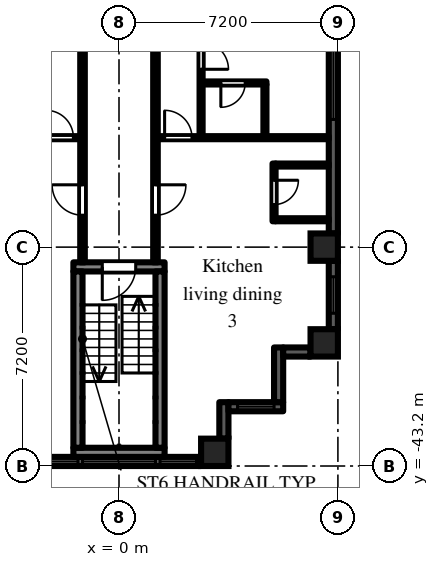
"""IFC4 building model, lengths in metres.
Left out: names, types, materials, properties, quantities, classifications, styles, units other than length and angle.
Written with IfcOpenShell. Run it as: python <this file> out.ifc"""

import sys

from ifc_helpers import new_model, si_unit, direction, frame, frame_2d, origin, origin_2d, place, context, subcontext, project, spatial, rectangle, extrude, element, fill, save


model = new_model("IFC4")
c1 = context("Model", 3, precision=1e-05, world=origin(), true_north=direction((0.0, 1.0)))
c2 = subcontext(c1, "Body", "Model", "MODEL_VIEW")
j1 = project(units=[si_unit("LENGTHUNIT", "METRE"), si_unit("PLANEANGLEUNIT", "RADIAN")], contexts=[c1])
p1 = place(None, origin())
s1 = spatial("IfcSite", under=j1, at=p1, CompositionType="ELEMENT")
p2 = place(p1, origin())
s2 = spatial("IfcBuilding", under=s1, at=p2, CompositionType="ELEMENT")
p3 = place(p2, frame((0.0, 0.0, 20.7)))
s3 = spatial("IfcBuildingStorey", under=s2, at=p3, CompositionType="ELEMENT", Elevation=20.7)
for number, where, z_axis, x_axis in (
    (1, (3.15, -42.75, 0.0), (0.0, 0.0, 1.0), (1.0, 0.0, 0.0)),
    (2, (6.75, -39.15, 0.0), (0.0, 0.0, 1.0), (1.0, 0.0, 0.0)),
    (3, (6.75, -36.0, 0.0), (0.0, 0.0, 1.0), (1.0, 0.0, 0.0)),
):
    element("IfcColumn", number, at=place(p3, frame(where, z_axis=z_axis, x_axis=x_axis)), inside=s3, PredefinedType="COLUMN", context=c2, shape_type="SweptSolid", body=[
        extrude(rectangle(XDim=0.9, YDim=0.9, at=origin_2d()), origin(), (0.0, 0.0, 1.0), 3.0),
    ])
p4 = place(p3, frame((-2.7, -43.05, 0.0), z_axis=(0.0, 0.0, 1.0), x_axis=(1.0, 0.0, 0.0)))
e4 = element("IfcWall", 4, at=p4, inside=s3, PredefinedType="SOLIDWALL", context=c2, shape_type="SweptSolid", body=[
    extrude(rectangle(XDim=5.4, YDim=0.3, at=frame_2d((2.7, 0.0))), origin(), (0.0, 0.0, 1.0), 2.1),
])
p5 = place(p4, frame((1.5, 0.0, 0.2)))
e5 = element("IfcOpeningElement", 5, at=p5, cuts=e4, PredefinedType="OPENING", context=c2, shape_type="SweptSolid", body=[
    extrude(rectangle(XDim=2.4, YDim=1.85, at=frame_2d((1.2, 0.925))), frame((0.0, 0.16, 0.0), z_axis=(0.0, -1.0, 0.0), x_axis=(1.0, 0.0, 0.0)), (0.0, 0.0, 1.0), 0.32),
])
p6 = place(p4, frame((0.15, 0.0, 0.2)))
e6 = element("IfcOpeningElement", 6, at=p6, cuts=e4, PredefinedType="OPENING", context=c2, shape_type="SweptSolid", body=[
    extrude(rectangle(XDim=1.2, YDim=1.85, at=frame_2d((0.6, 0.925))), frame((0.0, 0.16, 0.0), z_axis=(0.0, -1.0, 0.0), x_axis=(1.0, 0.0, 0.0)), (0.0, 0.0, 1.0), 0.32),
])
p7 = place(p4, frame((4.05, 0.0, 0.2)))
e7 = element("IfcOpeningElement", 7, at=p7, cuts=e4, PredefinedType="OPENING", context=c2, shape_type="SweptSolid", body=[
    extrude(rectangle(XDim=1.2, YDim=1.85, at=frame_2d((0.6, 0.925))), frame((0.0, 0.16, 0.0), z_axis=(0.0, -1.0, 0.0), x_axis=(1.0, 0.0, 0.0)), (0.0, 0.0, 1.0), 0.32),
])
p8 = place(p3, frame((3.45, -42.3, 0.0), z_axis=(0.0, 0.0, 1.0), x_axis=(0.0, 1.0, 0.0)))
e8 = element("IfcWall", 8, at=p8, inside=s3, PredefinedType="SOLIDWALL", context=c2, shape_type="SweptSolid", body=[
    extrude(rectangle(XDim=1.2, YDim=0.3, at=frame_2d((0.6, 0.0))), origin(), (0.0, 0.0, 1.0), 2.575),
])
p9 = place(p3, frame((3.6, -41.25, 0.0), z_axis=(0.0, 0.0, 1.0), x_axis=(1.0, 0.0, 0.0)))
e9 = element("IfcWall", 9, at=p9, inside=s3, PredefinedType="SOLIDWALL", context=c2, shape_type="SweptSolid", body=[
    extrude(rectangle(XDim=1.8, YDim=0.3, at=frame_2d((0.9, 0.0))), origin(), (0.0, 0.0, 1.0), 2.575),
])
p10 = place(p9, frame((0.3, 0.0, 0.2)))
e10 = element("IfcOpeningElement", 10, at=p10, cuts=e9, PredefinedType="OPENING", context=c2, shape_type="SweptSolid", body=[
    extrude(rectangle(XDim=1.2, YDim=1.85, at=frame_2d((0.6, 0.925))), frame((0.0, 0.16, 0.0), z_axis=(0.0, -1.0, 0.0), x_axis=(1.0, 0.0, 0.0)), (0.0, 0.0, 1.0), 0.32),
])
p11 = place(p3, frame((5.25, -41.1, 0.0), z_axis=(0.0, 0.0, 1.0), x_axis=(0.0, 1.0, 0.0)))
e11 = element("IfcWall", 11, at=p11, inside=s3, PredefinedType="SOLIDWALL", context=c2, shape_type="SweptSolid", body=[
    extrude(rectangle(XDim=1.8, YDim=0.3, at=frame_2d((0.9, 0.0))), origin(), (0.0, 0.0, 1.0), 2.575),
])
p12 = place(p3, frame((5.4, -39.45, 0.0), z_axis=(0.0, 0.0, 1.0), x_axis=(1.0, 0.0, 0.0)))
e12 = element("IfcWall", 12, at=p12, inside=s3, PredefinedType="SOLIDWALL", context=c2, shape_type="SweptSolid", body=[
    extrude(rectangle(XDim=0.9, YDim=0.3, at=frame_2d((0.45, 0.0))), origin(), (0.0, 0.0, 1.0), 2.575),
])
p13 = place(p3, frame((7.05, -38.7, 0.0), z_axis=(0.0, 0.0, 1.0), x_axis=(0.0, 1.0, 0.0)))
e13 = element("IfcWall", 13, at=p13, inside=s3, PredefinedType="SOLIDWALL", context=c2, shape_type="SweptSolid", body=[
    extrude(rectangle(XDim=2.25, YDim=0.3, at=frame_2d((1.125, 0.0))), origin(), (0.0, 0.0, 1.0), 2.1),
])
p14 = place(p13, frame((0.525, 0.0, 0.2)))
e14 = element("IfcOpeningElement", 14, at=p14, cuts=e13, PredefinedType="OPENING", context=c2, shape_type="SweptSolid", body=[
    extrude(rectangle(XDim=1.2, YDim=1.85, at=frame_2d((0.6, 0.925))), frame((0.0, 0.16, 0.0), z_axis=(0.0, -1.0, 0.0), x_axis=(1.0, 0.0, 0.0)), (0.0, 0.0, 1.0), 0.32),
])
p15 = place(p3, frame((7.05, -35.55, 0.0), z_axis=(0.0, 0.0, 1.0), x_axis=(0.0, 1.0, 0.0)))
e15 = element("IfcWall", 15, at=p15, inside=s3, PredefinedType="SOLIDWALL", context=c2, shape_type="SweptSolid", body=[
    extrude(rectangle(XDim=6.3, YDim=0.3, at=frame_2d((3.15, 0.0))), origin(), (0.0, 0.0, 1.0), 2.1),
])
p16 = place(p15, frame((3.75, 0.0, 0.2)))
e16 = element("IfcOpeningElement", 16, at=p16, cuts=e15, PredefinedType="OPENING", context=c2, shape_type="SweptSolid", body=[
    extrude(rectangle(XDim=2.4, YDim=1.85, at=frame_2d((1.2, 0.925))), frame((0.0, 0.16, 0.0), z_axis=(0.0, -1.0, 0.0), x_axis=(1.0, 0.0, 0.0)), (0.0, 0.0, 1.0), 0.32),
])
p17 = place(p3, frame((-1.5, -36.65, 0.0), z_axis=(0.0, 0.0, 1.0), x_axis=(1.0, 0.0, 0.0)))
e17 = element("IfcWall", 17, at=p17, inside=s3, PredefinedType="SHEAR", context=c2, shape_type="SweptSolid", body=[
    extrude(rectangle(XDim=3.0, YDim=0.3, at=frame_2d((1.5, 0.0))), origin(), (0.0, 0.0, 1.0), 2.575),
])
p18 = place(p17, frame((0.95, 0.0, 0.0)))
e18 = element("IfcOpeningElement", 18, at=p18, cuts=e17, PredefinedType="OPENING", context=c2, shape_type="SweptSolid", body=[
    extrude(rectangle(XDim=1.1, YDim=2.1, at=frame_2d((0.55, 1.05))), frame((0.0, 0.16, 0.0), z_axis=(0.0, -1.0, 0.0), x_axis=(1.0, 0.0, 0.0)), (0.0, 0.0, 1.0), 0.32),
])
p19 = place(p3, frame((-1.5, -42.75, 0.0), z_axis=(0.0, 0.0, 1.0), x_axis=(1.0, 0.0, 0.0)))
e19 = element("IfcWall", 19, at=p19, inside=s3, PredefinedType="SHEAR", context=c2, shape_type="SweptSolid", body=[
    extrude(rectangle(XDim=3.0, YDim=0.3, at=frame_2d((1.5, 0.0))), origin(), (0.0, 0.0, 1.0), 2.575),
])
for number, where, z_axis, x_axis in (
    (20, (-1.35, -36.8, 0.0), (0.0, 0.0, 1.0), (0.0, -1.0, 0.0)),
    (21, (1.35, -36.8, 0.0), (0.0, 0.0, 1.0), (0.0, -1.0, 0.0)),
):
    element("IfcWall", number, at=place(p3, frame(where, z_axis=z_axis, x_axis=x_axis)), inside=s3, PredefinedType="SHEAR", context=c2, shape_type="SweptSolid", body=[
        extrude(rectangle(XDim=5.8, YDim=0.3, at=frame_2d((2.9, 0.0))), origin(), (0.0, 0.0, 1.0), 2.575),
    ])
p20 = place(p3, frame((-6.9, -32.4, 0.0), z_axis=(0.0, 0.0, 1.0), x_axis=(1.0, 0.0, 0.0)))
e22 = element("IfcWall", 22, at=p20, inside=s3, PredefinedType="PARTITIONING", context=c2, shape_type="SweptSolid", body=[
    extrude(rectangle(XDim=5.625, YDim=0.1, at=frame_2d((2.812, 0.0))), origin(), (0.0, 0.0, 1.0), 2.575),
])
p21 = place(p20, frame((4.5, 0.0, 0.0)))
e23 = element("IfcOpeningElement", 23, at=p21, cuts=e22, PredefinedType="OPENING", context=c2, shape_type="SweptSolid", body=[
    extrude(rectangle(XDim=0.9, YDim=2.1, at=frame_2d((0.45, 1.05))), frame((0.0, 0.06, 0.0), z_axis=(0.0, -1.0, 0.0), x_axis=(1.0, 0.0, 0.0)), (0.0, 0.0, 1.0), 0.12),
])
p22 = place(p3, frame((-1.2, -36.5, 0.0), z_axis=(0.0, 0.0, 1.0), x_axis=(0.0, 1.0, 0.0)))
e24 = element("IfcWall", 24, at=p22, inside=s3, PredefinedType="PARTITIONING", context=c2, shape_type="SweptSolid", body=[
    extrude(rectangle(XDim=35.225, YDim=0.15, at=frame_2d((17.613, 0.0))), origin(), (0.0, 0.0, 1.0), 2.575),
])
p23 = place(p22, frame((30.35, 0.0, 0.0)))
e25 = element("IfcOpeningElement", 25, at=p23, cuts=e24, PredefinedType="OPENING", context=c2, shape_type="SweptSolid", body=[
    extrude(rectangle(XDim=0.9, YDim=2.1, at=frame_2d((0.45, 1.05))), frame((0.0, 0.085, 0.0), z_axis=(0.0, -1.0, 0.0), x_axis=(1.0, 0.0, 0.0)), (0.0, 0.0, 1.0), 0.17),
])
p24 = place(p22, frame((23.05, 0.0, 0.0)))
e26 = element("IfcOpeningElement", 26, at=p24, cuts=e24, PredefinedType="OPENING", context=c2, shape_type="SweptSolid", body=[
    extrude(rectangle(XDim=0.9, YDim=2.1, at=frame_2d((0.45, 1.05))), frame((0.0, 0.085, 0.0), z_axis=(0.0, -1.0, 0.0), x_axis=(1.0, 0.0, 0.0)), (0.0, 0.0, 1.0), 0.17),
])
p25 = place(p22, frame((26.65, 0.0, 0.0)))
e27 = element("IfcOpeningElement", 27, at=p25, cuts=e24, PredefinedType="OPENING", context=c2, shape_type="SweptSolid", body=[
    extrude(rectangle(XDim=0.9, YDim=2.1, at=frame_2d((0.45, 1.05))), frame((0.0, 0.085, 0.0), z_axis=(0.0, -1.0, 0.0), x_axis=(1.0, 0.0, 0.0)), (0.0, 0.0, 1.0), 0.17),
])
p26 = place(p22, frame((19.85, 0.0, 0.0)))
e28 = element("IfcOpeningElement", 28, at=p26, cuts=e24, PredefinedType="OPENING", context=c2, shape_type="SweptSolid", body=[
    extrude(rectangle(XDim=0.9, YDim=2.1, at=frame_2d((0.45, 1.05))), frame((0.0, 0.085, 0.0), z_axis=(0.0, -1.0, 0.0), x_axis=(1.0, 0.0, 0.0)), (0.0, 0.0, 1.0), 0.17),
])
p27 = place(p22, frame((1.55, 0.0, 0.0)))
e29 = element("IfcOpeningElement", 29, at=p27, cuts=e24, PredefinedType="OPENING", context=c2, shape_type="SweptSolid", body=[
    extrude(rectangle(XDim=1.0, YDim=2.1, at=frame_2d((0.5, 1.05))), frame((0.0, 0.085, 0.0), z_axis=(0.0, -1.0, 0.0), x_axis=(1.0, 0.0, 0.0)), (0.0, 0.0, 1.0), 0.17),
])
p28 = place(p3, frame((1.2, -36.5, 0.0), z_axis=(0.0, 0.0, 1.0), x_axis=(0.0, 1.0, 0.0)))
e30 = element("IfcWall", 30, at=p28, inside=s3, PredefinedType="PARTITIONING", context=c2, shape_type="SweptSolid", body=[
    extrude(rectangle(XDim=35.375, YDim=0.15, at=frame_2d((17.688, 0.0))), origin(), (0.0, 0.0, 1.0), 2.575),
])
p29 = place(p28, frame((31.85, 0.0, 0.0)))
e31 = element("IfcOpeningElement", 31, at=p29, cuts=e30, PredefinedType="OPENING", context=c2, shape_type="SweptSolid", body=[
    extrude(rectangle(XDim=0.9, YDim=2.1, at=frame_2d((0.45, 1.05))), frame((0.0, 0.085, 0.0), z_axis=(0.0, -1.0, 0.0), x_axis=(1.0, 0.0, 0.0)), (0.0, 0.0, 1.0), 0.17),
])
p30 = place(p28, frame((23.45, 0.0, 0.0)))
e32 = element("IfcOpeningElement", 32, at=p30, cuts=e30, PredefinedType="OPENING", context=c2, shape_type="SweptSolid", body=[
    extrude(rectangle(XDim=0.9, YDim=2.1, at=frame_2d((0.45, 1.05))), frame((0.0, 0.085, 0.0), z_axis=(0.0, -1.0, 0.0), x_axis=(1.0, 0.0, 0.0)), (0.0, 0.0, 1.0), 0.17),
])
p31 = place(p28, frame((1.55, 0.0, 0.0)))
e33 = element("IfcOpeningElement", 33, at=p31, cuts=e30, PredefinedType="OPENING", context=c2, shape_type="SweptSolid", body=[
    extrude(rectangle(XDim=1.0, YDim=2.1, at=frame_2d((0.5, 1.05))), frame((0.0, 0.085, 0.0), z_axis=(0.0, -1.0, 0.0), x_axis=(1.0, 0.0, 0.0)), (0.0, 0.0, 1.0), 0.17),
])
p32 = place(p3, frame((1.275, -32.4, 0.0), z_axis=(0.0, 0.0, 1.0), x_axis=(1.0, 0.0, 0.0)))
e34 = element("IfcWall", 34, at=p32, inside=s3, PredefinedType="PARTITIONING", context=c2, shape_type="SweptSolid", body=[
    extrude(rectangle(XDim=5.625, YDim=0.1, at=frame_2d((2.812, 0.0))), origin(), (0.0, 0.0, 1.0), 2.575),
])
p33 = place(p32, frame((0.225, 0.0, 0.0)))
e35 = element("IfcOpeningElement", 35, at=p33, cuts=e34, PredefinedType="OPENING", context=c2, shape_type="SweptSolid", body=[
    extrude(rectangle(XDim=0.9, YDim=2.1, at=frame_2d((0.45, 1.05))), frame((0.0, 0.06, 0.0), z_axis=(0.0, -1.0, 0.0), x_axis=(1.0, 0.0, 0.0)), (0.0, 0.0, 1.0), 0.12),
])
p34 = place(p3, frame((2.7, -32.35, 0.0), z_axis=(0.0, 0.0, 1.0), x_axis=(0.0, 1.0, 0.0)))
e36 = element("IfcWall", 36, at=p34, inside=s3, PredefinedType="PARTITIONING", context=c2, shape_type="SweptSolid", body=[
    extrude(rectangle(XDim=17.888, YDim=0.1, at=frame_2d((8.944, 0.0))), origin(), (0.0, 0.0, 1.0), 2.575),
])
p35 = place(p34, frame((2.2, 0.0, 0.0)))
e37 = element("IfcOpeningElement", 37, at=p35, cuts=e36, PredefinedType="OPENING", context=c2, shape_type="SweptSolid", body=[
    extrude(rectangle(XDim=0.9, YDim=2.1, at=frame_2d((0.45, 1.05))), frame((0.0, 0.06, 0.0), z_axis=(0.0, -1.0, 0.0), x_axis=(1.0, 0.0, 0.0)), (0.0, 0.0, 1.0), 0.12),
])
p36 = place(p34, frame((4.0, 0.0, 0.0)))
e38 = element("IfcOpeningElement", 38, at=p36, cuts=e36, PredefinedType="OPENING", context=c2, shape_type="SweptSolid", body=[
    extrude(rectangle(XDim=0.9, YDim=2.1, at=frame_2d((0.45, 1.05))), frame((0.0, 0.06, 0.0), z_axis=(0.0, -1.0, 0.0), x_axis=(1.0, 0.0, 0.0)), (0.0, 0.0, 1.0), 0.12),
])
p37 = place(p34, frame((9.4, 0.0, 0.0)))
e39 = element("IfcOpeningElement", 39, at=p37, cuts=e36, PredefinedType="OPENING", context=c2, shape_type="SweptSolid", body=[
    extrude(rectangle(XDim=0.9, YDim=2.1, at=frame_2d((0.45, 1.05))), frame((0.0, 0.06, 0.0), z_axis=(0.0, -1.0, 0.0), x_axis=(1.0, 0.0, 0.0)), (0.0, 0.0, 1.0), 0.12),
])
p38 = place(p34, frame((11.2, 0.0, 0.0)))
e40 = element("IfcOpeningElement", 40, at=p38, cuts=e36, PredefinedType="OPENING", context=c2, shape_type="SweptSolid", body=[
    extrude(rectangle(XDim=0.9, YDim=2.1, at=frame_2d((0.45, 1.05))), frame((0.0, 0.06, 0.0), z_axis=(0.0, -1.0, 0.0), x_axis=(1.0, 0.0, 0.0)), (0.0, 0.0, 1.0), 0.12),
])
p39 = place(p34, frame((14.8, 0.0, 0.0)))
e41 = element("IfcOpeningElement", 41, at=p39, cuts=e36, PredefinedType="OPENING", context=c2, shape_type="SweptSolid", body=[
    extrude(rectangle(XDim=0.9, YDim=2.1, at=frame_2d((0.45, 1.05))), frame((0.0, 0.06, 0.0), z_axis=(0.0, -1.0, 0.0), x_axis=(1.0, 0.0, 0.0)), (0.0, 0.0, 1.0), 0.12),
])
p40 = place(p3, frame((2.75, -30.6, 0.0), z_axis=(0.0, 0.0, 1.0), x_axis=(1.0, 0.0, 0.0)))
e42 = element("IfcWall", 42, at=p40, inside=s3, PredefinedType="PARTITIONING", context=c2, shape_type="SweptSolid", body=[
    extrude(rectangle(XDim=2.1, YDim=0.1, at=frame_2d((1.05, 0.0))), origin(), (0.0, 0.0, 1.0), 2.575),
])
p41 = place(p40, frame((0.6, 0.0, 0.0)))
e43 = element("IfcOpeningElement", 43, at=p41, cuts=e42, PredefinedType="OPENING", context=c2, shape_type="SweptSolid", body=[
    extrude(rectangle(XDim=0.8, YDim=2.1, at=frame_2d((0.4, 1.05))), frame((0.0, 0.06, 0.0), z_axis=(0.0, -1.0, 0.0), x_axis=(1.0, 0.0, 0.0)), (0.0, 0.0, 1.0), 0.12),
])
p42 = place(p3, frame((4.8, -32.35, 0.0), z_axis=(0.0, 0.0, 1.0), x_axis=(0.0, 1.0, 0.0)))
e44 = element("IfcWall", 44, at=p42, inside=s3, PredefinedType="PARTITIONING", context=c2, shape_type="SweptSolid", body=[
    extrude(rectangle(XDim=1.7, YDim=0.1, at=frame_2d((0.85, 0.0))), origin(), (0.0, 0.0, 1.0), 2.575),
])
p43 = place(p3, frame((5.1, -35.15, 0.0), z_axis=(0.0, 0.0, 1.0), x_axis=(0.0, 1.0, 0.0)))
e45 = element("IfcWall", 45, at=p43, inside=s3, PredefinedType="PARTITIONING", context=c2, shape_type="SweptSolid", body=[
    extrude(rectangle(XDim=1.9, YDim=0.1, at=frame_2d((0.95, 0.0))), origin(), (0.0, 0.0, 1.0), 2.575),
])
p44 = place(p43, frame((0.55, 0.0, 0.0)))
e46 = element("IfcOpeningElement", 46, at=p44, cuts=e45, PredefinedType="OPENING", context=c2, shape_type="SweptSolid", body=[
    extrude(rectangle(XDim=0.8, YDim=2.1, at=frame_2d((0.4, 1.05))), frame((0.0, 0.06, 0.0), z_axis=(0.0, -1.0, 0.0), x_axis=(1.0, 0.0, 0.0)), (0.0, 0.0, 1.0), 0.12),
])
for number, where, z_axis, x_axis in (
    (47, (5.15, -35.1, 0.0), (0.0, 0.0, 1.0), (1.0, 0.0, 0.0)),
    (48, (5.15, -33.3, 0.0), (0.0, 0.0, 1.0), (1.0, 0.0, 0.0)),
):
    element("IfcWall", number, at=place(p3, frame(where, z_axis=z_axis, x_axis=x_axis)), inside=s3, PredefinedType="PARTITIONING", context=c2, shape_type="SweptSolid", body=[
        extrude(rectangle(XDim=1.75, YDim=0.1, at=frame_2d((0.875, 0.0))), origin(), (0.0, 0.0, 1.0), 2.575),
    ])
p45 = place(p5, origin())
e49 = element("IfcWindow", 49, at=p45, inside=s3, PartitioningType="SINGLE_PANEL", PredefinedType="WINDOW", context=c2, shape_type="SweptSolid", body=[
    extrude(rectangle(XDim=2.4, YDim=1.85, at=frame_2d((1.2, 0.925))), frame((0.0, 0.03, 0.0), z_axis=(0.0, -1.0, 0.0), x_axis=(1.0, 0.0, 0.0)), (0.0, 0.0, 1.0), 0.06),
])
fill(e5, e49)
p46 = place(p6, origin())
e50 = element("IfcWindow", 50, at=p46, inside=s3, PartitioningType="SINGLE_PANEL", PredefinedType="WINDOW", context=c2, shape_type="SweptSolid", body=[
    extrude(rectangle(XDim=1.2, YDim=1.85, at=frame_2d((0.6, 0.925))), frame((0.0, 0.03, 0.0), z_axis=(0.0, -1.0, 0.0), x_axis=(1.0, 0.0, 0.0)), (0.0, 0.0, 1.0), 0.06),
])
fill(e6, e50)
p47 = place(p7, origin())
e51 = element("IfcWindow", 51, at=p47, inside=s3, PartitioningType="SINGLE_PANEL", PredefinedType="WINDOW", context=c2, shape_type="SweptSolid", body=[
    extrude(rectangle(XDim=1.2, YDim=1.85, at=frame_2d((0.6, 0.925))), frame((0.0, 0.03, 0.0), z_axis=(0.0, -1.0, 0.0), x_axis=(1.0, 0.0, 0.0)), (0.0, 0.0, 1.0), 0.06),
])
fill(e7, e51)
p48 = place(p10, origin())
e52 = element("IfcWindow", 52, at=p48, inside=s3, PartitioningType="SINGLE_PANEL", PredefinedType="WINDOW", context=c2, shape_type="SweptSolid", body=[
    extrude(rectangle(XDim=1.2, YDim=1.85, at=frame_2d((0.6, 0.925))), frame((0.0, 0.03, 0.0), z_axis=(0.0, -1.0, 0.0), x_axis=(1.0, 0.0, 0.0)), (0.0, 0.0, 1.0), 0.06),
])
fill(e10, e52)
p49 = place(p14, origin())
e53 = element("IfcWindow", 53, at=p49, inside=s3, PartitioningType="SINGLE_PANEL", PredefinedType="WINDOW", context=c2, shape_type="SweptSolid", body=[
    extrude(rectangle(XDim=1.2, YDim=1.85, at=frame_2d((0.6, 0.925))), frame((0.0, 0.03, 0.0), z_axis=(0.0, -1.0, 0.0), x_axis=(1.0, 0.0, 0.0)), (0.0, 0.0, 1.0), 0.06),
])
fill(e14, e53)
p50 = place(p16, origin())
e54 = element("IfcWindow", 54, at=p50, inside=s3, PartitioningType="SINGLE_PANEL", PredefinedType="WINDOW", context=c2, shape_type="SweptSolid", body=[
    extrude(rectangle(XDim=2.4, YDim=1.85, at=frame_2d((1.2, 0.925))), frame((0.0, 0.03, 0.0), z_axis=(0.0, -1.0, 0.0), x_axis=(1.0, 0.0, 0.0)), (0.0, 0.0, 1.0), 0.06),
])
fill(e16, e54)
p51 = place(p18, frame((1.1, 0.0, 0.0), z_axis=(0.0, 0.0, 1.0), x_axis=(-1.0, 0.0, 0.0)))
e55 = element("IfcDoor", 55, at=p51, inside=s3, OperationType="SINGLE_SWING_RIGHT", PredefinedType="DOOR", context=c2, shape_type="SweptSolid", body=[
    extrude(rectangle(XDim=1.1, YDim=2.1, at=frame_2d((0.55, 1.05))), frame((0.0, 0.025, 0.0), z_axis=(0.0, -1.0, 0.0), x_axis=(1.0, 0.0, 0.0)), (0.0, 0.0, 1.0), 0.05),
])
fill(e18, e55)
p52 = place(p44, frame((0.8, 0.0, 0.0), z_axis=(0.0, 0.0, 1.0), x_axis=(-1.0, 0.0, 0.0)))
e56 = element("IfcDoor", 56, at=p52, inside=s3, OperationType="SINGLE_SWING_LEFT", PredefinedType="DOOR", context=c2, shape_type="SweptSolid", body=[
    extrude(rectangle(XDim=0.8, YDim=2.1, at=frame_2d((0.4, 1.05))), frame((0.0, 0.025, 0.0), z_axis=(0.0, -1.0, 0.0), x_axis=(1.0, 0.0, 0.0)), (0.0, 0.0, 1.0), 0.05),
])
fill(e46, e56)
p53 = place(p31, frame((1.0, 0.0, 0.0), z_axis=(0.0, 0.0, 1.0), x_axis=(-1.0, 0.0, 0.0)))
e57 = element("IfcDoor", 57, at=p53, inside=s3, OperationType="SINGLE_SWING_LEFT", PredefinedType="DOOR", context=c2, shape_type="SweptSolid", body=[
    extrude(rectangle(XDim=1.0, YDim=2.1, at=frame_2d((0.5, 1.05))), frame((0.0, 0.025, 0.0), z_axis=(0.0, -1.0, 0.0), x_axis=(1.0, 0.0, 0.0)), (0.0, 0.0, 1.0), 0.05),
])
fill(e33, e57)
p54 = place(p33, origin())
e58 = element("IfcDoor", 58, at=p54, inside=s3, OperationType="SINGLE_SWING_LEFT", PredefinedType="DOOR", context=c2, shape_type="SweptSolid", body=[
    extrude(rectangle(XDim=0.9, YDim=2.1, at=frame_2d((0.45, 1.05))), frame((0.0, 0.025, 0.0), z_axis=(0.0, -1.0, 0.0), x_axis=(1.0, 0.0, 0.0)), (0.0, 0.0, 1.0), 0.05),
])
fill(e35, e58)
p55 = place(p35, frame((0.9, 0.0, 0.0), z_axis=(0.0, 0.0, 1.0), x_axis=(-1.0, 0.0, 0.0)))
e59 = element("IfcDoor", 59, at=p55, inside=s3, OperationType="SINGLE_SWING_RIGHT", PredefinedType="DOOR", context=c2, shape_type="SweptSolid", body=[
    extrude(rectangle(XDim=0.9, YDim=2.1, at=frame_2d((0.45, 1.05))), frame((0.0, 0.025, 0.0), z_axis=(0.0, -1.0, 0.0), x_axis=(1.0, 0.0, 0.0)), (0.0, 0.0, 1.0), 0.05),
])
fill(e37, e59)
p56 = place(p41, frame((0.8, 0.0, 0.0), z_axis=(0.0, 0.0, 1.0), x_axis=(-1.0, 0.0, 0.0)))
e60 = element("IfcDoor", 60, at=p56, inside=s3, OperationType="SINGLE_SWING_RIGHT", PredefinedType="DOOR", context=c2, shape_type="SweptSolid", body=[
    extrude(rectangle(XDim=0.8, YDim=2.1, at=frame_2d((0.4, 1.05))), frame((0.0, 0.025, 0.0), z_axis=(0.0, -1.0, 0.0), x_axis=(1.0, 0.0, 0.0)), (0.0, 0.0, 1.0), 0.05),
])
fill(e43, e60)
p57 = place(p27, origin())
e61 = element("IfcDoor", 61, at=p57, inside=s3, OperationType="SINGLE_SWING_RIGHT", PredefinedType="DOOR", context=c2, shape_type="SweptSolid", body=[
    extrude(rectangle(XDim=1.0, YDim=2.1, at=frame_2d((0.5, 1.05))), frame((0.0, 0.025, 0.0), z_axis=(0.0, -1.0, 0.0), x_axis=(1.0, 0.0, 0.0)), (0.0, 0.0, 1.0), 0.05),
])
fill(e29, e61)
p58 = place(p21, origin())
e62 = element("IfcDoor", 62, at=p58, inside=s3, OperationType="SINGLE_SWING_LEFT", PredefinedType="DOOR", context=c2, shape_type="SweptSolid", body=[
    extrude(rectangle(XDim=0.9, YDim=2.1, at=frame_2d((0.45, 1.05))), frame((0.0, 0.025, 0.0), z_axis=(0.0, -1.0, 0.0), x_axis=(1.0, 0.0, 0.0)), (0.0, 0.0, 1.0), 0.05),
])
fill(e23, e62)
save(model, sys.argv[1])
